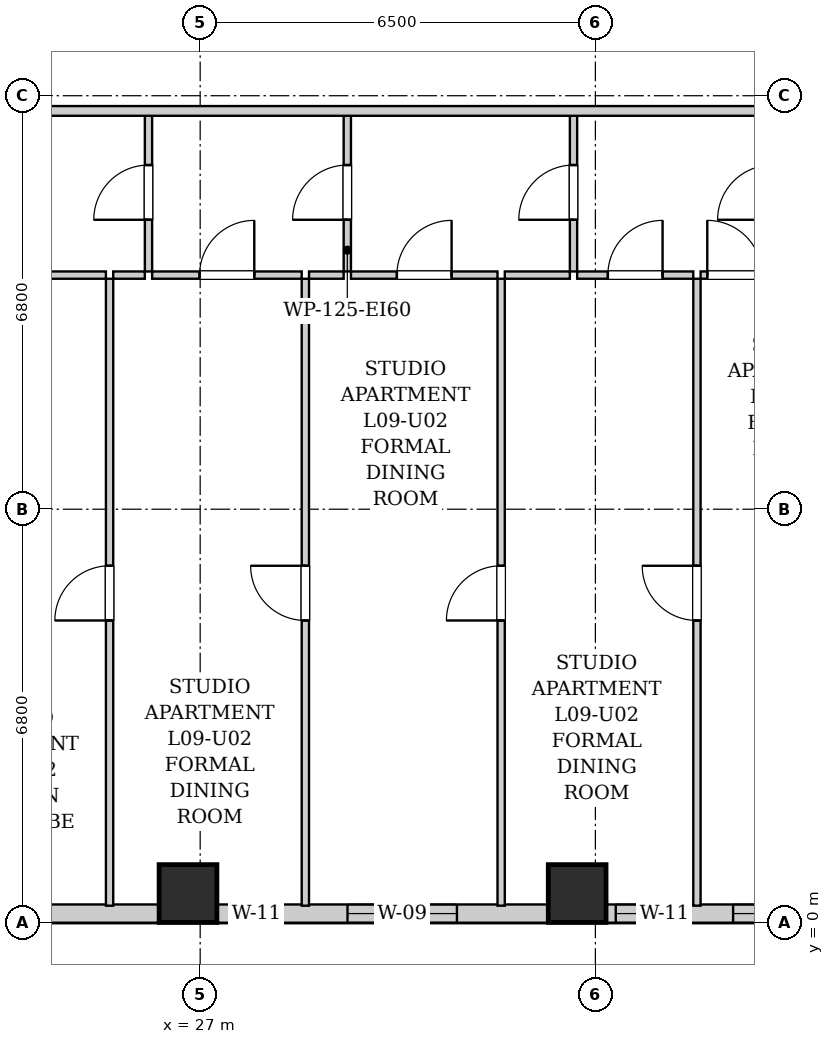
"""IFC4 building model, lengths in metres.
Left out: names, types, materials, properties, quantities, classifications, styles, units other than length and angle.
Written with IfcOpenShell. Run it as: python <this file> out.ifc"""

import sys

from ifc_helpers import new_model, si_unit, direction, frame, frame_2d, origin, origin_2d, place, context, subcontext, project, spatial, rectangle, extrude, element, fill, save


model = new_model("IFC4")
c1 = context("Model", 3, precision=1e-05, world=origin(), true_north=direction((0.0, 1.0)))
c2 = subcontext(c1, "Body", "Model", "MODEL_VIEW")
j1 = project(units=[si_unit("LENGTHUNIT", "METRE"), si_unit("PLANEANGLEUNIT", "RADIAN")], contexts=[c1])
p1 = place(None, origin())
s1 = spatial("IfcSite", under=j1, at=p1, CompositionType="ELEMENT")
p2 = place(p1, origin())
s2 = spatial("IfcBuilding", under=s1, at=p2, CompositionType="ELEMENT")
p3 = place(p2, frame((0.0, 0.0, 38.6)))
s3 = spatial("IfcBuildingStorey", under=s2, at=p3, CompositionType="ELEMENT", Elevation=38.6)
for number, where, z_axis, x_axis in (
    (1, (26.8, 0.48, 0.0), (0.0, 0.0, 1.0), (1.0, 0.0, 0.0)),
    (2, (33.2, 0.48, 0.0), (0.0, 0.0, 1.0), (1.0, 0.0, 0.0)),
):
    element("IfcColumn", number, at=place(p3, frame(where, z_axis=z_axis, x_axis=x_axis)), inside=s3, PredefinedType="COLUMN", context=c2, shape_type="SweptSolid", body=[
        extrude(rectangle(XDim=0.95, YDim=0.95, at=origin_2d()), origin(), (0.0, 0.0, 1.0), 3.2),
    ])
p4 = place(p3, frame((44.0, 0.15, 0.0), z_axis=(0.0, 0.0, 1.0), x_axis=(-1.0, 0.0, 0.0)))
e3 = element("IfcWall", 3, at=p4, inside=s3, PredefinedType="SOLIDWALL", context=c2, shape_type="SweptSolid", body=[
    extrude(rectangle(XDim=25.7, YDim=0.3, at=frame_2d((12.85, 0.0))), origin(), (0.0, 0.0, 1.0), 1.975),
])
p5 = place(p4, frame((22.471, 0.0, 0.55)))
e4 = element("IfcOpeningElement", 4, at=p5, cuts=e3, PredefinedType="OPENING", context=c2, shape_type="SweptSolid", body=[
    extrude(rectangle(XDim=1.8, YDim=1.2, at=frame_2d((0.9, 0.6))), frame((0.0, 0.16, 0.0), z_axis=(0.0, -1.0, 0.0), x_axis=(1.0, 0.0, 0.0)), (0.0, 0.0, 1.0), 0.32),
])
p6 = place(p4, frame((15.65, 0.0, 0.55)))
e5 = element("IfcOpeningElement", 5, at=p6, cuts=e3, PredefinedType="OPENING", context=c2, shape_type="SweptSolid", body=[
    extrude(rectangle(XDim=0.85, YDim=1.2, at=frame_2d((0.425, 0.6))), frame((0.0, 0.16, 0.0), z_axis=(0.0, -1.0, 0.0), x_axis=(1.0, 0.0, 0.0)), (0.0, 0.0, 1.0), 0.32),
])
p7 = place(p4, frame((12.777, 0.0, 0.55)))
e6 = element("IfcOpeningElement", 6, at=p7, cuts=e3, PredefinedType="OPENING", context=c2, shape_type="SweptSolid", body=[
    extrude(rectangle(XDim=1.8, YDim=1.2, at=frame_2d((0.9, 0.6))), frame((0.0, 0.16, 0.0), z_axis=(0.0, -1.0, 0.0), x_axis=(1.0, 0.0, 0.0)), (0.0, 0.0, 1.0), 0.32),
])
p8 = place(p4, frame((9.315, 0.0, 0.55)))
e7 = element("IfcOpeningElement", 7, at=p8, cuts=e3, PredefinedType="OPENING", context=c2, shape_type="SweptSolid", body=[
    extrude(rectangle(XDim=0.85, YDim=1.2, at=frame_2d((0.425, 0.6))), frame((0.0, 0.16, 0.0), z_axis=(0.0, -1.0, 0.0), x_axis=(1.0, 0.0, 0.0)), (0.0, 0.0, 1.0), 0.32),
])
p9 = place(p4, frame((6.435, 0.0, 0.55)))
e8 = element("IfcOpeningElement", 8, at=p9, cuts=e3, PredefinedType="OPENING", context=c2, shape_type="SweptSolid", body=[
    extrude(rectangle(XDim=1.8, YDim=1.2, at=frame_2d((0.9, 0.6))), frame((0.0, 0.16, 0.0), z_axis=(0.0, -1.0, 0.0), x_axis=(1.0, 0.0, 0.0)), (0.0, 0.0, 1.0), 0.32),
])
p10 = place(p4, frame((2.106, 0.0, 0.55)))
e9 = element("IfcOpeningElement", 9, at=p10, cuts=e3, PredefinedType="OPENING", context=c2, shape_type="SweptSolid", body=[
    extrude(rectangle(XDim=1.8, YDim=1.2, at=frame_2d((0.9, 0.6))), frame((0.0, 0.16, 0.0), z_axis=(0.0, -1.0, 0.0), x_axis=(1.0, 0.0, 0.0)), (0.0, 0.0, 1.0), 0.32),
])
p11 = place(p3, frame((26.15, 10.71, 0.0), z_axis=(0.0, 0.0, 1.0), x_axis=(0.0, 1.0, 0.0)))
e10 = element("IfcWall", 10, at=p11, inside=s3, PredefinedType="PARTITIONING", context=c2, shape_type="SweptSolid", body=[
    extrude(rectangle(XDim=2.6, YDim=0.12, at=frame_2d((1.3, 0.0))), origin(), (0.0, 0.0, 1.0), 2.94),
])
p12 = place(p11, frame((0.85, 0.0, 0.0)))
e11 = element("IfcOpeningElement", 11, at=p12, cuts=e10, PredefinedType="OPENING", context=c2, shape_type="SweptSolid", body=[
    extrude(rectangle(XDim=0.9, YDim=2.05, at=frame_2d((0.45, 1.025))), frame((0.0, 0.07, 0.0), z_axis=(0.0, -1.0, 0.0), x_axis=(1.0, 0.0, 0.0)), (0.0, 0.0, 1.0), 0.14),
])
p13 = place(p3, frame((22.35, 10.65, 0.0), z_axis=(0.0, 0.0, 1.0), x_axis=(1.0, 0.0, 0.0)))
e12 = element("IfcWall", 12, at=p13, inside=s3, PredefinedType="PARTITIONING", context=c2, shape_type="SweptSolid", body=[
    extrude(rectangle(XDim=3.1, YDim=0.12, at=frame_2d((1.55, 0.0))), origin(), (0.0, 0.0, 1.0), 2.94),
])
p14 = place(p13, frame((1.1, 0.0, 0.0)))
e13 = element("IfcOpeningElement", 13, at=p14, cuts=e12, PredefinedType="OPENING", context=c2, shape_type="SweptSolid", body=[
    extrude(rectangle(XDim=0.9, YDim=2.05, at=frame_2d((0.45, 1.025))), frame((0.0, 0.07, 0.0), z_axis=(0.0, -1.0, 0.0), x_axis=(1.0, 0.0, 0.0)), (0.0, 0.0, 1.0), 0.14),
])
p15 = place(p3, frame((25.57, 10.65, 0.0), z_axis=(0.0, 0.0, 1.0), x_axis=(1.0, 0.0, 0.0)))
e14 = element("IfcWall", 14, at=p15, inside=s3, PredefinedType="PARTITIONING", context=c2, shape_type="SweptSolid", body=[
    extrude(rectangle(XDim=0.52, YDim=0.12, at=frame_2d((0.26, 0.0))), origin(), (0.0, 0.0, 1.0), 2.94),
])
p16 = place(p3, frame((29.42, 10.71, 0.0), z_axis=(0.0, 0.0, 1.0), x_axis=(0.0, 1.0, 0.0)))
e15 = element("IfcWall", 15, at=p16, inside=s3, PredefinedType="PARTITIONING", context=c2, shape_type="SweptSolid", body=[
    extrude(rectangle(XDim=2.6, YDim=0.12, at=frame_2d((1.3, 0.0))), origin(), (0.0, 0.0, 1.0), 2.94),
])
p17 = place(p16, frame((0.85, 0.0, 0.0)))
e16 = element("IfcOpeningElement", 16, at=p17, cuts=e15, PredefinedType="OPENING", context=c2, shape_type="SweptSolid", body=[
    extrude(rectangle(XDim=0.9, YDim=2.05, at=frame_2d((0.45, 1.025))), frame((0.0, 0.07, 0.0), z_axis=(0.0, -1.0, 0.0), x_axis=(1.0, 0.0, 0.0)), (0.0, 0.0, 1.0), 0.14),
])
p18 = place(p3, frame((26.21, 10.65, 0.0), z_axis=(0.0, 0.0, 1.0), x_axis=(1.0, 0.0, 0.0)))
e17 = element("IfcWall", 17, at=p18, inside=s3, PredefinedType="PARTITIONING", context=c2, shape_type="SweptSolid", body=[
    extrude(rectangle(XDim=2.46, YDim=0.12, at=frame_2d((1.23, 0.0))), origin(), (0.0, 0.0, 1.0), 2.94),
])
p19 = place(p18, frame((0.78, 0.0, 0.0)))
e18 = element("IfcOpeningElement", 18, at=p19, cuts=e17, PredefinedType="OPENING", context=c2, shape_type="SweptSolid", body=[
    extrude(rectangle(XDim=0.9, YDim=2.05, at=frame_2d((0.45, 1.025))), frame((0.0, 0.07, 0.0), z_axis=(0.0, -1.0, 0.0), x_axis=(1.0, 0.0, 0.0)), (0.0, 0.0, 1.0), 0.14),
])
p20 = place(p3, frame((28.79, 10.65, 0.0), z_axis=(0.0, 0.0, 1.0), x_axis=(1.0, 0.0, 0.0)))
e19 = element("IfcWall", 19, at=p20, inside=s3, PredefinedType="PARTITIONING", context=c2, shape_type="SweptSolid", body=[
    extrude(rectangle(XDim=0.57, YDim=0.12, at=frame_2d((0.285, 0.0))), origin(), (0.0, 0.0, 1.0), 2.94),
])
p21 = place(p3, frame((33.14, 10.71, 0.0), z_axis=(0.0, 0.0, 1.0), x_axis=(0.0, 1.0, 0.0)))
e20 = element("IfcWall", 20, at=p21, inside=s3, PredefinedType="PARTITIONING", context=c2, shape_type="SweptSolid", body=[
    extrude(rectangle(XDim=2.6, YDim=0.12, at=frame_2d((1.3, 0.0))), origin(), (0.0, 0.0, 1.0), 2.155),
])
p22 = place(p21, frame((0.85, 0.0, 0.0)))
e21 = element("IfcOpeningElement", 21, at=p22, cuts=e20, PredefinedType="OPENING", context=c2, shape_type="SweptSolid", body=[
    extrude(rectangle(XDim=0.9, YDim=2.05, at=frame_2d((0.45, 1.025))), frame((0.0, 0.07, 0.0), z_axis=(0.0, -1.0, 0.0), x_axis=(1.0, 0.0, 0.0)), (0.0, 0.0, 1.0), 0.14),
])
p23 = place(p3, frame((29.48, 10.65, 0.0), z_axis=(0.0, 0.0, 1.0), x_axis=(1.0, 0.0, 0.0)))
e22 = element("IfcWall", 22, at=p23, inside=s3, PredefinedType="PARTITIONING", context=c2, shape_type="SweptSolid", body=[
    extrude(rectangle(XDim=2.41, YDim=0.12, at=frame_2d((1.205, 0.0))), origin(), (0.0, 0.0, 1.0), 2.94),
])
p24 = place(p23, frame((0.755, 0.0, 0.0)))
e23 = element("IfcOpeningElement", 23, at=p24, cuts=e22, PredefinedType="OPENING", context=c2, shape_type="SweptSolid", body=[
    extrude(rectangle(XDim=0.9, YDim=2.05, at=frame_2d((0.45, 1.025))), frame((0.0, 0.07, 0.0), z_axis=(0.0, -1.0, 0.0), x_axis=(1.0, 0.0, 0.0)), (0.0, 0.0, 1.0), 0.14),
])
p25 = place(p3, frame((32.01, 10.65, 0.0), z_axis=(0.0, 0.0, 1.0), x_axis=(1.0, 0.0, 0.0)))
e24 = element("IfcWall", 24, at=p25, inside=s3, PredefinedType="PARTITIONING", context=c2, shape_type="SweptSolid", body=[
    extrude(rectangle(XDim=1.07, YDim=0.12, at=frame_2d((0.535, 0.0))), origin(), (0.0, 0.0, 1.0), 2.94),
])
p26 = place(p3, frame((33.2, 10.65, 0.0), z_axis=(0.0, 0.0, 1.0), x_axis=(1.0, 0.0, 0.0)))
e25 = element("IfcWall", 25, at=p26, inside=s3, PredefinedType="PARTITIONING", context=c2, shape_type="SweptSolid", body=[
    extrude(rectangle(XDim=1.91, YDim=0.12, at=frame_2d((0.955, 0.0))), origin(), (0.0, 0.0, 1.0), 2.94),
])
p27 = place(p26, frame((0.505, 0.0, 0.0)))
e26 = element("IfcOpeningElement", 26, at=p27, cuts=e25, PredefinedType="OPENING", context=c2, shape_type="SweptSolid", body=[
    extrude(rectangle(XDim=0.9, YDim=2.05, at=frame_2d((0.45, 1.025))), frame((0.0, 0.07, 0.0), z_axis=(0.0, -1.0, 0.0), x_axis=(1.0, 0.0, 0.0)), (0.0, 0.0, 1.0), 0.14),
])
p28 = place(p3, frame((35.23, 10.65, 0.0), z_axis=(0.0, 0.0, 1.0), x_axis=(1.0, 0.0, 0.0)))
e27 = element("IfcWall", 27, at=p28, inside=s3, PredefinedType="PARTITIONING", context=c2, shape_type="SweptSolid", body=[
    extrude(rectangle(XDim=1.12, YDim=0.12, at=frame_2d((0.56, 0.0))), origin(), (0.0, 0.0, 1.0), 2.94),
])
p29 = place(p28, frame((0.11, 0.0, 0.0)))
e28 = element("IfcOpeningElement", 28, at=p29, cuts=e27, PredefinedType="OPENING", context=c2, shape_type="SweptSolid", body=[
    extrude(rectangle(XDim=0.9, YDim=2.05, at=frame_2d((0.45, 1.025))), frame((0.0, 0.07, 0.0), z_axis=(0.0, -1.0, 0.0), x_axis=(1.0, 0.0, 0.0)), (0.0, 0.0, 1.0), 0.14),
])
p30 = place(p3, frame((25.51, 0.28, 0.0), z_axis=(0.0, 0.0, 1.0), x_axis=(0.0, 1.0, 0.0)))
e29 = element("IfcWall", 29, at=p30, inside=s3, PredefinedType="PARTITIONING", context=c2, shape_type="SweptSolid", body=[
    extrude(rectangle(XDim=10.31, YDim=0.12, at=frame_2d((5.155, 0.0))), origin(), (0.0, 0.0, 1.0), 2.94),
])
p31 = place(p30, frame((4.69, 0.0, 0.0)))
e30 = element("IfcOpeningElement", 30, at=p31, cuts=e29, PredefinedType="OPENING", context=c2, shape_type="SweptSolid", body=[
    extrude(rectangle(XDim=0.9, YDim=2.05, at=frame_2d((0.45, 1.025))), frame((0.0, 0.07, 0.0), z_axis=(0.0, -1.0, 0.0), x_axis=(1.0, 0.0, 0.0)), (0.0, 0.0, 1.0), 0.14),
])
p32 = place(p3, frame((28.73, 0.28, 0.0), z_axis=(0.0, 0.0, 1.0), x_axis=(0.0, 1.0, 0.0)))
e31 = element("IfcWall", 31, at=p32, inside=s3, PredefinedType="PARTITIONING", context=c2, shape_type="SweptSolid", body=[
    extrude(rectangle(XDim=10.31, YDim=0.12, at=frame_2d((5.155, 0.0))), origin(), (0.0, 0.0, 1.0), 2.94),
])
p33 = place(p32, frame((4.69, 0.0, 0.0)))
e32 = element("IfcOpeningElement", 32, at=p33, cuts=e31, PredefinedType="OPENING", context=c2, shape_type="SweptSolid", body=[
    extrude(rectangle(XDim=0.9, YDim=2.05, at=frame_2d((0.45, 1.025))), frame((0.0, 0.07, 0.0), z_axis=(0.0, -1.0, 0.0), x_axis=(1.0, 0.0, 0.0)), (0.0, 0.0, 1.0), 0.14),
])
p34 = place(p3, frame((31.95, 0.28, 0.0), z_axis=(0.0, 0.0, 1.0), x_axis=(0.0, 1.0, 0.0)))
e33 = element("IfcWall", 33, at=p34, inside=s3, PredefinedType="PARTITIONING", context=c2, shape_type="SweptSolid", body=[
    extrude(rectangle(XDim=10.31, YDim=0.12, at=frame_2d((5.155, 0.0))), origin(), (0.0, 0.0, 1.0), 2.94),
])
p35 = place(p34, frame((4.69, 0.0, 0.0)))
e34 = element("IfcOpeningElement", 34, at=p35, cuts=e33, PredefinedType="OPENING", context=c2, shape_type="SweptSolid", body=[
    extrude(rectangle(XDim=0.9, YDim=2.05, at=frame_2d((0.45, 1.025))), frame((0.0, 0.07, 0.0), z_axis=(0.0, -1.0, 0.0), x_axis=(1.0, 0.0, 0.0)), (0.0, 0.0, 1.0), 0.14),
])
p36 = place(p3, frame((35.17, 0.28, 0.0), z_axis=(0.0, 0.0, 1.0), x_axis=(0.0, 1.0, 0.0)))
e35 = element("IfcWall", 35, at=p36, inside=s3, PredefinedType="PARTITIONING", context=c2, shape_type="SweptSolid", body=[
    extrude(rectangle(XDim=10.31, YDim=0.12, at=frame_2d((5.155, 0.0))), origin(), (0.0, 0.0, 1.0), 2.94),
])
p37 = place(p36, frame((4.69, 0.0, 0.0)))
e36 = element("IfcOpeningElement", 36, at=p37, cuts=e35, PredefinedType="OPENING", context=c2, shape_type="SweptSolid", body=[
    extrude(rectangle(XDim=0.9, YDim=2.05, at=frame_2d((0.45, 1.025))), frame((0.0, 0.07, 0.0), z_axis=(0.0, -1.0, 0.0), x_axis=(1.0, 0.0, 0.0)), (0.0, 0.0, 1.0), 0.14),
])
p38 = place(p3, frame((10.05, 13.35, 0.0), z_axis=(0.0, 0.0, 1.0), x_axis=(1.0, 0.0, 0.0)))
e37 = element("IfcWall", 37, at=p38, inside=s3, PredefinedType="PARTITIONING", context=c2, shape_type="SweptSolid", body=[
    extrude(rectangle(XDim=33.9, YDim=0.16, at=frame_2d((16.95, 0.0))), origin(), (0.0, 0.0, 1.0), 2.94),
])
p39 = place(p38, frame((3.8, 0.0, 0.0)))
e38 = element("IfcOpeningElement", 38, at=p39, cuts=e37, PredefinedType="OPENING", context=c2, shape_type="SweptSolid", body=[
    extrude(rectangle(XDim=0.95, YDim=2.1, at=frame_2d((0.475, 1.05))), frame((0.0, 0.09, 0.0), z_axis=(0.0, -1.0, 0.0), x_axis=(1.0, 0.0, 0.0)), (0.0, 0.0, 1.0), 0.18),
])
p40 = place(p38, frame((13.345, 0.0, 0.0)))
e39 = element("IfcOpeningElement", 39, at=p40, cuts=e37, PredefinedType="OPENING", context=c2, shape_type="SweptSolid", body=[
    extrude(rectangle(XDim=0.95, YDim=2.1, at=frame_2d((0.475, 1.05))), frame((0.0, 0.09, 0.0), z_axis=(0.0, -1.0, 0.0), x_axis=(1.0, 0.0, 0.0)), (0.0, 0.0, 1.0), 0.18),
])
p41 = place(p12, origin())
e40 = element("IfcDoor", 40, at=p41, inside=s3, OperationType="SINGLE_SWING_LEFT", PredefinedType="DOOR", context=c2, shape_type="SweptSolid", body=[
    extrude(rectangle(XDim=0.9, YDim=2.05, at=frame_2d((0.45, 1.025))), frame((0.0, 0.025, 0.0), z_axis=(0.0, -1.0, 0.0), x_axis=(1.0, 0.0, 0.0)), (0.0, 0.0, 1.0), 0.05),
])
fill(e11, e40)
p42 = place(p17, origin())
e41 = element("IfcDoor", 41, at=p42, inside=s3, OperationType="SINGLE_SWING_LEFT", PredefinedType="DOOR", context=c2, shape_type="SweptSolid", body=[
    extrude(rectangle(XDim=0.9, YDim=2.05, at=frame_2d((0.45, 1.025))), frame((0.0, 0.025, 0.0), z_axis=(0.0, -1.0, 0.0), x_axis=(1.0, 0.0, 0.0)), (0.0, 0.0, 1.0), 0.05),
])
fill(e16, e41)
p43 = place(p19, origin())
e42 = element("IfcDoor", 42, at=p43, inside=s3, OperationType="SINGLE_SWING_RIGHT", PredefinedType="DOOR", context=c2, shape_type="SweptSolid", body=[
    extrude(rectangle(XDim=0.9, YDim=2.05, at=frame_2d((0.45, 1.025))), frame((0.0, 0.025, 0.0), z_axis=(0.0, -1.0, 0.0), x_axis=(1.0, 0.0, 0.0)), (0.0, 0.0, 1.0), 0.05),
])
fill(e18, e42)
p44 = place(p22, origin())
e43 = element("IfcDoor", 43, at=p44, inside=s3, OperationType="SINGLE_SWING_LEFT", PredefinedType="DOOR", context=c2, shape_type="SweptSolid", body=[
    extrude(rectangle(XDim=0.9, YDim=2.05, at=frame_2d((0.45, 1.025))), frame((0.0, 0.025, 0.0), z_axis=(0.0, -1.0, 0.0), x_axis=(1.0, 0.0, 0.0)), (0.0, 0.0, 1.0), 0.05),
])
fill(e21, e43)
p45 = place(p24, origin())
e44 = element("IfcDoor", 44, at=p45, inside=s3, OperationType="SINGLE_SWING_RIGHT", PredefinedType="DOOR", context=c2, shape_type="SweptSolid", body=[
    extrude(rectangle(XDim=0.9, YDim=2.05, at=frame_2d((0.45, 1.025))), frame((0.0, 0.025, 0.0), z_axis=(0.0, -1.0, 0.0), x_axis=(1.0, 0.0, 0.0)), (0.0, 0.0, 1.0), 0.05),
])
fill(e23, e44)
p46 = place(p27, origin())
e45 = element("IfcDoor", 45, at=p46, inside=s3, OperationType="SINGLE_SWING_RIGHT", PredefinedType="DOOR", context=c2, shape_type="SweptSolid", body=[
    extrude(rectangle(XDim=0.9, YDim=2.05, at=frame_2d((0.45, 1.025))), frame((0.0, 0.025, 0.0), z_axis=(0.0, -1.0, 0.0), x_axis=(1.0, 0.0, 0.0)), (0.0, 0.0, 1.0), 0.05),
])
fill(e26, e45)
p47 = place(p29, origin())
e46 = element("IfcDoor", 46, at=p47, inside=s3, OperationType="SINGLE_SWING_LEFT", PredefinedType="DOOR", context=c2, shape_type="SweptSolid", body=[
    extrude(rectangle(XDim=0.9, YDim=2.05, at=frame_2d((0.45, 1.025))), frame((0.0, 0.025, 0.0), z_axis=(0.0, -1.0, 0.0), x_axis=(1.0, 0.0, 0.0)), (0.0, 0.0, 1.0), 0.05),
])
fill(e28, e46)
p48 = place(p31, origin())
e47 = element("IfcDoor", 47, at=p48, inside=s3, OperationType="SINGLE_SWING_LEFT", PredefinedType="DOOR", context=c2, shape_type="SweptSolid", body=[
    extrude(rectangle(XDim=0.9, YDim=2.05, at=frame_2d((0.45, 1.025))), frame((0.0, 0.025, 0.0), z_axis=(0.0, -1.0, 0.0), x_axis=(1.0, 0.0, 0.0)), (0.0, 0.0, 1.0), 0.05),
])
fill(e30, e47)
p49 = place(p33, origin())
e48 = element("IfcDoor", 48, at=p49, inside=s3, OperationType="SINGLE_SWING_RIGHT", PredefinedType="DOOR", context=c2, shape_type="SweptSolid", body=[
    extrude(rectangle(XDim=0.9, YDim=2.05, at=frame_2d((0.45, 1.025))), frame((0.0, 0.025, 0.0), z_axis=(0.0, -1.0, 0.0), x_axis=(1.0, 0.0, 0.0)), (0.0, 0.0, 1.0), 0.05),
])
fill(e32, e48)
p50 = place(p35, origin())
e49 = element("IfcDoor", 49, at=p50, inside=s3, OperationType="SINGLE_SWING_LEFT", PredefinedType="DOOR", context=c2, shape_type="SweptSolid", body=[
    extrude(rectangle(XDim=0.9, YDim=2.05, at=frame_2d((0.45, 1.025))), frame((0.0, 0.025, 0.0), z_axis=(0.0, -1.0, 0.0), x_axis=(1.0, 0.0, 0.0)), (0.0, 0.0, 1.0), 0.05),
])
fill(e34, e49)
p51 = place(p37, origin())
e50 = element("IfcDoor", 50, at=p51, inside=s3, OperationType="SINGLE_SWING_RIGHT", PredefinedType="DOOR", context=c2, shape_type="SweptSolid", body=[
    extrude(rectangle(XDim=0.9, YDim=2.05, at=frame_2d((0.45, 1.025))), frame((0.0, 0.025, 0.0), z_axis=(0.0, -1.0, 0.0), x_axis=(1.0, 0.0, 0.0)), (0.0, 0.0, 1.0), 0.05),
])
fill(e36, e50)
p52 = place(p6, origin())
e51 = element("IfcWindow", 51, at=p52, inside=s3, PartitioningType="SINGLE_PANEL", PredefinedType="WINDOW", context=c2, shape_type="SweptSolid", body=[
    extrude(rectangle(XDim=0.85, YDim=1.2, at=frame_2d((0.425, 0.6))), frame((0.0, 0.03, 0.0), z_axis=(0.0, -1.0, 0.0), x_axis=(1.0, 0.0, 0.0)), (0.0, 0.0, 1.0), 0.06),
])
fill(e5, e51)
p53 = place(p7, origin())
e52 = element("IfcWindow", 52, at=p53, inside=s3, PartitioningType="DOUBLE_PANEL_VERTICAL", PredefinedType="WINDOW", context=c2, shape_type="SweptSolid", body=[
    extrude(rectangle(XDim=1.8, YDim=1.2, at=frame_2d((0.9, 0.6))), frame((0.0, 0.03, 0.0), z_axis=(0.0, -1.0, 0.0), x_axis=(1.0, 0.0, 0.0)), (0.0, 0.0, 1.0), 0.06),
])
fill(e6, e52)
p54 = place(p8, origin())
e53 = element("IfcWindow", 53, at=p54, inside=s3, PartitioningType="SINGLE_PANEL", PredefinedType="WINDOW", context=c2, shape_type="SweptSolid", body=[
    extrude(rectangle(XDim=0.85, YDim=1.2, at=frame_2d((0.425, 0.6))), frame((0.0, 0.03, 0.0), z_axis=(0.0, -1.0, 0.0), x_axis=(1.0, 0.0, 0.0)), (0.0, 0.0, 1.0), 0.06),
])
fill(e7, e53)
p55 = place(p9, origin())
e54 = element("IfcWindow", 54, at=p55, inside=s3, PartitioningType="DOUBLE_PANEL_VERTICAL", PredefinedType="WINDOW", context=c2, shape_type="SweptSolid", body=[
    extrude(rectangle(XDim=1.8, YDim=1.2, at=frame_2d((0.9, 0.6))), frame((0.0, 0.03, 0.0), z_axis=(0.0, -1.0, 0.0), x_axis=(1.0, 0.0, 0.0)), (0.0, 0.0, 1.0), 0.06),
])
fill(e8, e54)
save(model, sys.argv[1])
